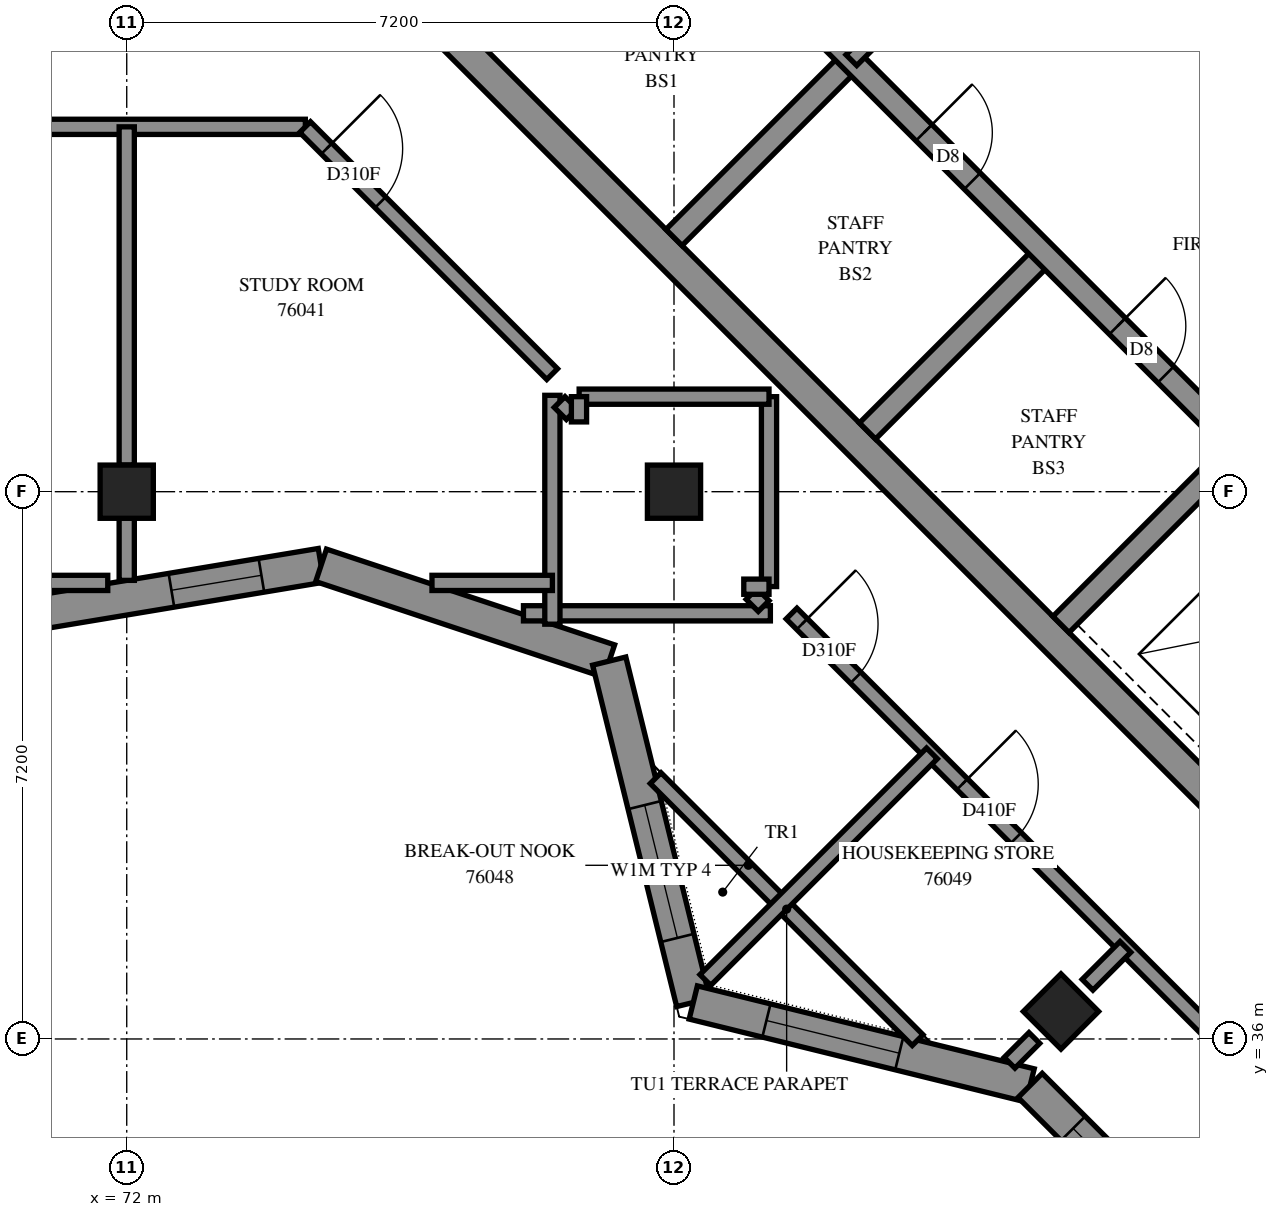
"""IFC4 building model, lengths in metres.
Left out: names, types, materials, properties, quantities, classifications, styles, units other than length and angle.
Written with IfcOpenShell. Run it as: python <this file> out.ifc"""

import sys

from ifc_helpers import new_model, si_unit, direction, frame, frame_2d, origin, origin_2d, place, context, subcontext, project, spatial, polyline, rectangle, outline, extrude, element, fill, save


model = new_model("IFC4")
c1 = context("Model", 3, precision=1e-05, world=origin(), true_north=direction((0.0, 1.0)))
c2 = subcontext(c1, "Body", "Model", "MODEL_VIEW")
j1 = project(units=[si_unit("LENGTHUNIT", "METRE"), si_unit("PLANEANGLEUNIT", "RADIAN")], contexts=[c1])
p1 = place(None, origin())
s1 = spatial("IfcSite", under=j1, at=p1, CompositionType="ELEMENT")
p2 = place(p1, origin())
s2 = spatial("IfcBuilding", under=s1, at=p2, CompositionType="ELEMENT")
p3 = place(p2, frame((0.0, 0.0, 277.8)))
s3 = spatial("IfcBuildingStorey", under=s2, at=p3, CompositionType="ELEMENT", Elevation=277.8)
for number, where, z_axis, x_axis in (
    (1, (72.0, 43.2, 0.0), (0.0, 0.0, 1.0), (1.0, 0.0, 0.0)),
    (2, (79.2, 43.2, 0.0), (0.0, 0.0, 1.0), (1.0, 0.0, 0.0)),
    (3, (84.291, 36.362, 0.0), (0.0, 0.0, 1.0), (0.707, -0.707, 0.0)),
):
    element("IfcColumn", number, at=place(p3, frame(where, z_axis=z_axis, x_axis=x_axis)), inside=s3, PredefinedType="COLUMN", context=c2, shape_type="SweptSolid", body=[
        extrude(rectangle(XDim=0.7, YDim=0.7, at=origin_2d()), origin(), (0.0, 0.0, 1.0), 3.1),
    ])
p4 = place(p3, frame((76.23, 49.231, -0.3), z_axis=(0.0, 0.0, 1.0), x_axis=(0.7071034917, -0.7071100706, 0.0)))
e4 = element("IfcWall", 4, at=p4, inside=s3, PredefinedType="SHEAR", context=c2, shape_type="SweptSolid", body=[
    extrude(rectangle(XDim=15.2, YDim=0.4, at=frame_2d((7.6, 0.0))), origin(), (0.0, 0.0, 1.0), 2.7),
])
p5 = place(p3, frame((79.2, 46.544, 0.0), z_axis=(0.0, 0.0, 1.0), x_axis=(0.7071219326, 0.7070916295, 0.0)))
e5 = element("IfcWall", 5, at=p5, inside=s3, PredefinedType="SOLIDWALL", context=c2, shape_type="SweptSolid", body=[
    extrude(rectangle(XDim=3.3, YDim=0.3, at=frame_2d((1.65, 0.0))), origin(), (0.0, 0.0, 1.0), 3.1),
])
for number, where, z_axis, x_axis in (
    (6, (81.746, 43.999, 0.0), (0.0, 0.0, 1.0), (0.707, 0.707, 0.0)),
    (7, (84.291, 41.453, 0.0), (0.0, 0.0, 1.0), (0.707, 0.707, 0.0)),
):
    element("IfcWall", number, at=place(p3, frame(where, z_axis=z_axis, x_axis=x_axis)), inside=s3, PredefinedType="SOLIDWALL", context=c2, shape_type="SweptSolid", body=[
        extrude(rectangle(XDim=3.3, YDim=0.3, at=frame_2d((1.65, 0.0))), origin(), (0.0, 0.0, 1.0), 3.1),
    ])
p6 = place(p3, frame((78.988, 51.423, 0.0), z_axis=(0.0, 0.0, 1.0), x_axis=(0.7071067812, -0.7071067812, 0.0)))
e8 = element("IfcWall", 8, at=p6, inside=s3, PredefinedType="SOLIDWALL", context=c2, shape_type="SweptSolid", body=[
    extrude(rectangle(XDim=14.4, YDim=0.3, at=frame_2d((7.2, 0.0))), origin(), (0.0, 0.0, 1.0), 3.1),
])
p7 = place(p6, frame((1.35, 0.0, 0.0)))
e9 = element("IfcOpeningElement", 9, at=p7, cuts=e8, PredefinedType="OPENING", context=c2, shape_type="SweptSolid", body=[
    extrude(rectangle(XDim=0.9, YDim=2.1, at=frame_2d((0.45, 1.05))), frame((0.0, 0.16, 0.0), z_axis=(0.0, -1.0, 0.0), x_axis=(1.0, 0.0, 0.0)), (0.0, 0.0, 1.0), 0.32),
])
p8 = place(p6, frame((4.95, 0.0, 0.0)))
e10 = element("IfcOpeningElement", 10, at=p8, cuts=e8, PredefinedType="OPENING", context=c2, shape_type="SweptSolid", body=[
    extrude(rectangle(XDim=0.9, YDim=2.1, at=frame_2d((0.45, 1.05))), frame((0.0, 0.16, 0.0), z_axis=(0.0, -1.0, 0.0), x_axis=(1.0, 0.0, 0.0)), (0.0, 0.0, 1.0), 0.32),
])
p9 = place(p6, frame((8.55, 0.0, 0.0)))
e11 = element("IfcOpeningElement", 11, at=p9, cuts=e8, PredefinedType="OPENING", context=c2, shape_type="SweptSolid", body=[
    extrude(rectangle(XDim=0.9, YDim=2.1, at=frame_2d((0.45, 1.05))), frame((0.0, 0.16, 0.0), z_axis=(0.0, -1.0, 0.0), x_axis=(1.0, 0.0, 0.0)), (0.0, 0.0, 1.0), 0.32),
])
p10 = place(p6, frame((12.05, 0.0, 0.0)))
e12 = element("IfcOpeningElement", 12, at=p10, cuts=e8, PredefinedType="OPENING", context=c2, shape_type="SweptSolid", body=[
    extrude(rectangle(XDim=1.1, YDim=2.1, at=frame_2d((0.55, 1.05))), frame((0.0, 0.16, 0.0), z_axis=(0.0, -1.0, 0.0), x_axis=(1.0, 0.0, 0.0)), (0.0, 0.0, 1.0), 0.32),
])
p11 = place(p3, frame((81.534, 53.969, 0.0), z_axis=(0.0, 0.0, 1.0), x_axis=(0.707103309, -0.7071102534, 0.0)))
e13 = element("IfcWall", 13, at=p11, inside=s3, PredefinedType="SOLIDWALL", context=c2, shape_type="SweptSolid", body=[
    extrude(rectangle(XDim=14.4, YDim=0.3, at=frame_2d((7.2, 0.0))), origin(), (0.0, 0.0, 1.0), 3.1),
])
p12 = place(p11, frame((8.55, 0.0, 0.0)))
e14 = element("IfcOpeningElement", 14, at=p12, cuts=e13, PredefinedType="OPENING", context=c2, shape_type="SweptSolid", body=[
    extrude(rectangle(XDim=0.9, YDim=2.1, at=frame_2d((0.45, 1.05))), frame((0.0, 0.16, 0.0), z_axis=(0.0, -1.0, 0.0), x_axis=(1.0, 0.0, 0.0)), (0.0, 0.0, 1.0), 0.32),
])
p13 = place(p11, frame((1.25, 0.0, 0.0)))
e15 = element("IfcOpeningElement", 15, at=p13, cuts=e13, PredefinedType="OPENING", context=c2, shape_type="SweptSolid", body=[
    extrude(rectangle(XDim=1.1, YDim=2.1, at=frame_2d((0.55, 1.05))), frame((0.0, 0.16, 0.0), z_axis=(0.0, -1.0, 0.0), x_axis=(1.0, 0.0, 0.0)), (0.0, 0.0, 1.0), 0.32),
])
p14 = place(p11, frame((4.85, 0.0, 0.0)))
e16 = element("IfcOpeningElement", 16, at=p14, cuts=e13, PredefinedType="OPENING", context=c2, shape_type="SweptSolid", body=[
    extrude(rectangle(XDim=1.1, YDim=2.1, at=frame_2d((0.55, 1.05))), frame((0.0, 0.16, 0.0), z_axis=(0.0, -1.0, 0.0), x_axis=(1.0, 0.0, 0.0)), (0.0, 0.0, 1.0), 0.32),
])
p15 = place(p11, frame((12.05, 0.0, 0.0)))
e17 = element("IfcOpeningElement", 17, at=p15, cuts=e13, PredefinedType="OPENING", context=c2, shape_type="SweptSolid", body=[
    extrude(rectangle(XDim=1.1, YDim=2.1, at=frame_2d((0.55, 1.05))), frame((0.0, 0.16, 0.0), z_axis=(0.0, -1.0, 0.0), x_axis=(1.0, 0.0, 0.0)), (0.0, 0.0, 1.0), 0.32),
])
p16 = place(p3, frame((70.919, 41.625, 0.0), z_axis=(0.0, 0.0, 1.0), x_axis=(0.9864078441, 0.1643154439, 0.0)))
e18 = element("IfcWall", 18, at=p16, inside=s3, PredefinedType="SOLIDWALL", context=c2, shape_type="SweptSolid", body=[
    extrude(outline(polyline([(-0.037, -0.225), (3.632, -0.225), (3.744, 0.225), (0.037, 0.225), (-0.037, -0.225)])), origin(), (0.0, 0.0, 1.0), 3.1),
])
p17 = place(p16, frame((1.692, 0.0, 0.45)))
e19 = element("IfcOpeningElement", 19, at=p17, cuts=e18, PredefinedType="OPENING", context=c2, shape_type="SweptSolid", body=[
    extrude(rectangle(XDim=1.2, YDim=2.55, at=frame_2d((0.6, 1.275))), frame((0.0, 0.235, 0.0), z_axis=(0.0, -1.0, 0.0), x_axis=(1.0, 0.0, 0.0)), (0.0, 0.0, 1.0), 0.47),
])
p18 = place(p3, frame((74.557, 42.231, 0.0), z_axis=(0.0, 0.0, 1.0), x_axis=(0.9489708056, -0.3153639328, 0.0)))
e20 = element("IfcWall", 20, at=p18, inside=s3, PredefinedType="SOLIDWALL", context=c2, shape_type="SweptSolid", body=[
    extrude(outline(polyline([(0.056, -0.225), (3.87, -0.225), (4.119, 0.225), (-0.056, 0.225), (0.056, -0.225)])), origin(), (0.0, 0.0, 1.0), 3.1),
])
p19 = place(p3, frame((78.348, 40.971, 0.0), z_axis=(0.0, 0.0, 1.0), x_axis=(0.239085216, -0.9709985888, 0.0)))
e21 = element("IfcWall", 21, at=p19, inside=s3, PredefinedType="SOLIDWALL", context=c2, shape_type="SweptSolid", body=[
    extrude(outline(polyline([(0.124, -0.225), (4.762, -0.225), (4.489, 0.225), (-0.124, 0.225), (0.124, -0.225)])), origin(), (0.0, 0.0, 1.0), 3.1),
])
p20 = place(p19, frame((1.951, 0.0, 0.7)))
e22 = element("IfcOpeningElement", 22, at=p20, cuts=e21, PredefinedType="OPENING", context=c2, shape_type="SweptSolid", body=[
    extrude(rectangle(XDim=1.8, YDim=1.8, at=frame_2d((0.9, 0.9))), frame((0.0, 0.235, 0.0), z_axis=(0.0, -1.0, 0.0), x_axis=(1.0, 0.0, 0.0)), (0.0, 0.0, 1.0), 0.47),
])
p21 = place(p3, frame((79.454, 36.48, 0.0), z_axis=(0.0, 0.0, 1.0), x_axis=(0.9709986041, -0.239085154, 0.0)))
e23 = element("IfcWall", 23, at=p21, inside=s3, PredefinedType="SOLIDWALL", context=c2, shape_type="SweptSolid", body=[
    extrude(outline(polyline([(-0.136, -0.225), (4.501, -0.225), (4.627, 0.225), (0.136, 0.225), (-0.136, -0.225)])), origin(), (0.0, 0.0, 1.0), 3.1),
])
p22 = place(p21, frame((0.991, 0.0, 0.7)))
e24 = element("IfcOpeningElement", 24, at=p22, cuts=e23, PredefinedType="OPENING", context=c2, shape_type="SweptSolid", body=[
    extrude(rectangle(XDim=1.8, YDim=1.8, at=frame_2d((0.9, 0.9))), frame((0.0, 0.235, 0.0), z_axis=(0.0, -1.0, 0.0), x_axis=(1.0, 0.0, 0.0)), (0.0, 0.0, 1.0), 0.47),
])
p23 = place(p3, frame((83.885, 35.389, 0.0), z_axis=(0.0, 0.0, 1.0), x_axis=(0.7071067812, -0.7071067812, 0.0)))
e25 = element("IfcWall", 25, at=p23, inside=s3, PredefinedType="SOLIDWALL", context=c2, shape_type="SweptSolid", body=[
    extrude(outline(polyline([(0.063, -0.225), (7.999, -0.225), (7.549, 0.225), (-0.063, 0.225), (0.063, -0.225)])), origin(), (0.0, 0.0, 1.0), 3.1),
])
p24 = place(p23, frame((0.799, 0.0, 0.7)))
e26 = element("IfcOpeningElement", 26, at=p24, cuts=e25, PredefinedType="OPENING", context=c2, shape_type="SweptSolid", body=[
    extrude(rectangle(XDim=1.8, YDim=1.8, at=frame_2d((0.9, 0.9))), frame((0.0, 0.235, 0.0), z_axis=(0.0, -1.0, 0.0), x_axis=(1.0, 0.0, 0.0)), (0.0, 0.0, 1.0), 0.47),
])
p25 = place(p23, frame((4.099, 0.0, 0.7)))
e27 = element("IfcOpeningElement", 27, at=p25, cuts=e25, PredefinedType="OPENING", context=c2, shape_type="SweptSolid", body=[
    extrude(rectangle(XDim=1.8, YDim=1.8, at=frame_2d((0.9, 0.9))), frame((0.0, 0.235, 0.0), z_axis=(0.0, -1.0, 0.0), x_axis=(1.0, 0.0, 0.0)), (0.0, 0.0, 1.0), 0.47),
])
p26 = place(p3, frame((82.405, 35.985, 0.0), z_axis=(0.0, 0.0, 1.0), x_axis=(-0.7071067812, 0.7071067812, 0.0)))
e28 = element("IfcWall", 28, at=p26, inside=s3, PredefinedType="PARAPET", context=c2, shape_type="SweptSolid", body=[
    extrude(outline(polyline([(0.0, -0.1), (4.874, -0.1), (4.874, 0.1), (0.0, 0.1), (0.0, -0.1)])), origin(), (0.0, 0.0, 1.0), 0.25),
])
p27 = place(p3, frame((81.534, 48.878, 0.0), z_axis=(0.0, 0.0, 1.0), x_axis=(0.707092892, 0.7071206701, 0.0)))
e29 = element("IfcWall", 29, at=p27, inside=s3, PredefinedType="PARTITIONING", context=c2, shape_type="SweptSolid", body=[
    extrude(rectangle(XDim=3.6, YDim=0.2, at=frame_2d((1.8, 0.0))), origin(), (0.0, 0.0, 1.0), 3.1),
])
p28 = place(p3, frame((55.2, 48.0, 0.0), z_axis=(0.0, 0.0, 1.0), x_axis=(1.0, 0.0, 0.0)))
e30 = element("IfcWall", 30, at=p28, inside=s3, PredefinedType="PARTITIONING", context=c2, shape_type="SweptSolid", body=[
    extrude(rectangle(XDim=19.15, YDim=0.2, at=frame_2d((9.575, 0.0))), origin(), (0.0, 0.0, 1.0), 3.1),
])
p29 = place(p28, frame((4.475, 0.0, 0.0)))
e31 = element("IfcOpeningElement", 31, at=p29, cuts=e30, PredefinedType="OPENING", context=c2, shape_type="SweptSolid", body=[
    extrude(rectangle(XDim=1.0, YDim=2.1, at=frame_2d((0.5, 1.05))), frame((0.0, 0.11, 0.0), z_axis=(0.0, -1.0, 0.0), x_axis=(1.0, 0.0, 0.0)), (0.0, 0.0, 1.0), 0.22),
])
p30 = place(p28, frame((6.525, 0.0, 0.0)))
e32 = element("IfcOpeningElement", 32, at=p30, cuts=e30, PredefinedType="OPENING", context=c2, shape_type="SweptSolid", body=[
    extrude(rectangle(XDim=1.0, YDim=2.1, at=frame_2d((0.5, 1.05))), frame((0.0, 0.11, 0.0), z_axis=(0.0, -1.0, 0.0), x_axis=(1.0, 0.0, 0.0)), (0.0, 0.0, 1.0), 0.22),
])
p31 = place(p28, frame((13.463, 0.0, 0.0)))
e33 = element("IfcOpeningElement", 33, at=p31, cuts=e30, PredefinedType="OPENING", context=c2, shape_type="SweptSolid", body=[
    extrude(rectangle(XDim=1.0, YDim=2.1, at=frame_2d((0.5, 1.05))), frame((0.0, 0.11, 0.0), z_axis=(0.0, -1.0, 0.0), x_axis=(1.0, 0.0, 0.0)), (0.0, 0.0, 1.0), 0.22),
])
p32 = place(p3, frame((80.747, 41.597, 0.0), z_axis=(0.0, 0.0, 1.0), x_axis=(0.7071067812, -0.7071067812, 0.0)))
e34 = element("IfcWall", 34, at=p32, inside=s3, PredefinedType="PARTITIONING", context=c2, shape_type="SweptSolid", body=[
    extrude(rectangle(XDim=8.607, YDim=0.2, at=frame_2d((4.303, 0.0))), origin(), (0.0, 0.0, 1.0), 3.1),
])
p33 = place(p32, frame((0.195, 0.0, 0.0)))
e35 = element("IfcOpeningElement", 35, at=p33, cuts=e34, PredefinedType="OPENING", context=c2, shape_type="SweptSolid", body=[
    extrude(rectangle(XDim=1.0, YDim=2.1, at=frame_2d((0.5, 1.05))), frame((0.0, 0.11, 0.0), z_axis=(0.0, -1.0, 0.0), x_axis=(1.0, 0.0, 0.0)), (0.0, 0.0, 1.0), 0.22),
])
p34 = place(p32, frame((3.175, 0.0, 0.0)))
e36 = element("IfcOpeningElement", 36, at=p34, cuts=e34, PredefinedType="OPENING", context=c2, shape_type="SweptSolid", body=[
    extrude(rectangle(XDim=1.0, YDim=2.1, at=frame_2d((0.5, 1.05))), frame((0.0, 0.11, 0.0), z_axis=(0.0, -1.0, 0.0), x_axis=(1.0, 0.0, 0.0)), (0.0, 0.0, 1.0), 0.22),
])
p35 = place(p3, frame((74.347, 47.997, 0.0), z_axis=(0.0, 0.0, 1.0), x_axis=(0.7071067812, -0.7071067812, 0.0)))
e37 = element("IfcWall", 37, at=p35, inside=s3, PredefinedType="PARTITIONING", context=c2, shape_type="SweptSolid", body=[
    extrude(rectangle(XDim=4.596, YDim=0.2, at=frame_2d((2.298, 0.0))), origin(), (0.0, 0.0, 1.0), 3.1),
])
p36 = place(p35, frame((0.401, 0.0, 0.0)))
e38 = element("IfcOpeningElement", 38, at=p36, cuts=e37, PredefinedType="OPENING", context=c2, shape_type="SweptSolid", body=[
    extrude(rectangle(XDim=1.0, YDim=2.1, at=frame_2d((0.5, 1.05))), frame((0.0, 0.11, 0.0), z_axis=(0.0, -1.0, 0.0), x_axis=(1.0, 0.0, 0.0)), (0.0, 0.0, 1.0), 0.22),
])
p37 = place(p3, frame((72.0, 43.55, 0.0), z_axis=(0.0, 0.0, 1.0), x_axis=(0.0, 1.0, 0.0)))
e39 = element("IfcWall", 39, at=p37, inside=s3, PredefinedType="PARTITIONING", context=c2, shape_type="SweptSolid", body=[
    extrude(rectangle(XDim=4.45, YDim=0.2, at=frame_2d((2.225, 0.0))), origin(), (0.0, 0.0, 1.0), 3.1),
])
p38 = place(p3, frame((79.612, 36.776, 0.0), z_axis=(0.0, 0.0, 1.0), x_axis=(0.7071186423, 0.7070949199, 0.0)))
e40 = element("IfcWall", 40, at=p38, inside=s3, PredefinedType="PARTITIONING", context=c2, shape_type="SweptSolid", body=[
    extrude(rectangle(XDim=4.215, YDim=0.2, at=frame_2d((2.108, 0.0))), origin(), (0.0, 0.0, 1.0), 3.1),
])
p39 = place(p3, frame((77.219, 41.6, 0.0), z_axis=(0.0, 0.0, 1.0), x_axis=(1.0, 0.0, 0.0)))
e41 = element("IfcWall", 41, at=p39, inside=s3, PredefinedType="PARTITIONING", context=c2, shape_type="SweptSolid", body=[
    extrude(rectangle(XDim=3.248, YDim=0.2, at=frame_2d((1.624, 0.0))), origin(), (0.0, 0.0, 1.0), 3.1),
])
p40 = place(p3, frame((77.6, 41.457, 0.0), z_axis=(0.0, 0.0, 1.0), x_axis=(0.0, 1.0, 0.0)))
e42 = element("IfcWall", 42, at=p40, inside=s3, PredefinedType="PARTITIONING", context=c2, shape_type="SweptSolid", body=[
    extrude(rectangle(XDim=3.011, YDim=0.2, at=frame_2d((1.506, 0.0))), origin(), (0.0, 0.0, 1.0), 3.1),
])
for number, where, z_axis, x_axis in (
    (43, (80.45, 41.952, 0.0), (0.0, 0.0, 1.0), (0.0, 1.0, 0.0)),
    (44, (77.952, 44.45, 0.0), (0.0, 0.0, 1.0), (1.0, 0.0, 0.0)),
):
    element("IfcWall", number, at=place(p3, frame(where, z_axis=z_axis, x_axis=x_axis)), inside=s3, PredefinedType="PARTITIONING", context=c2, shape_type="SweptSolid", body=[
        extrude(rectangle(XDim=2.498, YDim=0.2, at=frame_2d((1.249, 0.0))), origin(), (0.0, 0.0, 1.0), 3.1),
    ])
p41 = place(p3, frame((70.088, 42.0, 0.0), z_axis=(0.0, 0.0, 1.0), x_axis=(1.0, 0.0, 0.0)))
e45 = element("IfcWall", 45, at=p41, inside=s3, PredefinedType="PARTITIONING", context=c2, shape_type="SweptSolid", body=[
    extrude(rectangle(XDim=1.663, YDim=0.2, at=frame_2d((0.831, 0.0))), origin(), (0.0, 0.0, 1.0), 3.1),
])
p42 = place(p3, frame((76.016, 42.0, 0.0), z_axis=(0.0, 0.0, 1.0), x_axis=(1.0, 0.0, 0.0)))
e46 = element("IfcWall", 46, at=p42, inside=s3, PredefinedType="PARTITIONING", context=c2, shape_type="SweptSolid", body=[
    extrude(rectangle(XDim=1.584, YDim=0.2, at=frame_2d((0.792, 0.0))), origin(), (0.0, 0.0, 1.0), 3.1),
])
p43 = place(p3, frame((72.0, 42.033, 0.0), z_axis=(0.0, 0.0, 1.0), x_axis=(0.0, 1.0, 0.0)))
e47 = element("IfcWall", 47, at=p43, inside=s3, PredefinedType="PARTITIONING", context=c2, shape_type="SweptSolid", body=[
    extrude(rectangle(XDim=0.817, YDim=0.2, at=frame_2d((0.408, 0.0))), origin(), (0.0, 0.0, 1.0), 3.1),
])
p44 = place(p3, frame((84.641, 36.713, 0.0), z_axis=(0.0, 0.0, 1.0), x_axis=(0.7071067812, 0.7071067812, 0.0)))
e48 = element("IfcWall", 48, at=p44, inside=s3, PredefinedType="PARTITIONING", context=c2, shape_type="SweptSolid", body=[
    extrude(rectangle(XDim=0.704, YDim=0.2, at=frame_2d((0.352, 0.0))), origin(), (0.0, 0.0, 1.0), 3.1),
])
for number, where, z_axis, x_axis in (
    (49, (80.221, 41.855, 0.0), (0.0, 0.0, 1.0), (0.707, -0.707, 0.0)),
    (50, (77.695, 44.38, 0.0), (0.0, 0.0, 1.0), (0.707, -0.707, 0.0)),
):
    element("IfcWall", number, at=place(p3, frame(where, z_axis=z_axis, x_axis=x_axis)), inside=s3, PredefinedType="PARTITIONING", context=c2, shape_type="SweptSolid", body=[
        extrude(rectangle(XDim=0.225, YDim=0.2, at=frame_2d((0.112, 0.0))), origin(), (0.0, 0.0, 1.0), 3.1),
    ])
p45 = place(p3, frame((83.615, 35.687, 0.0), z_axis=(0.0, 0.0, 1.0), x_axis=(0.7069983375, 0.7072152082, 0.0)))
e51 = element("IfcWall", 51, at=p45, inside=s3, PredefinedType="PARTITIONING", context=c2, shape_type="SweptSolid", body=[
    extrude(rectangle(XDim=0.461, YDim=0.2, at=frame_2d((0.231, 0.0))), origin(), (0.0, 0.0, 1.0), 3.1),
])
for number, where, z_axis, x_axis in (
    (52, (80.118, 41.95, 0.0), (0.0, 0.0, 1.0), (1.0, 0.0, 0.0)),
    (53, (77.95, 44.118, 0.0), (0.0, 0.0, 1.0), (0.0, 1.0, 0.0)),
):
    element("IfcWall", number, at=place(p3, frame(where, z_axis=z_axis, x_axis=x_axis)), inside=s3, PredefinedType="PARTITIONING", context=c2, shape_type="SweptSolid", body=[
        extrude(rectangle(XDim=0.332, YDim=0.2, at=frame_2d((0.166, 0.0))), origin(), (0.0, 0.0, 1.0), 3.1),
    ])
p46 = place(p17, origin())
e54 = element("IfcWindow", 54, at=p46, inside=s3, PartitioningType="SINGLE_PANEL", PredefinedType="WINDOW", context=c2, shape_type="SweptSolid", body=[
    extrude(rectangle(XDim=1.2, YDim=2.55, at=frame_2d((0.6, 1.275))), frame((0.0, 0.205, 0.0), z_axis=(0.0, -1.0, 0.0), x_axis=(1.0, 0.0, 0.0)), (0.0, 0.0, 1.0), 0.06),
])
fill(e19, e54)
p47 = place(p20, origin())
e55 = element("IfcWindow", 55, at=p47, inside=s3, PartitioningType="SINGLE_PANEL", PredefinedType="WINDOW", context=c2, shape_type="SweptSolid", body=[
    extrude(rectangle(XDim=1.8, YDim=1.8, at=frame_2d((0.9, 0.9))), frame((0.0, 0.205, 0.0), z_axis=(0.0, -1.0, 0.0), x_axis=(1.0, 0.0, 0.0)), (0.0, 0.0, 1.0), 0.06),
])
fill(e22, e55)
p48 = place(p22, origin())
e56 = element("IfcWindow", 56, at=p48, inside=s3, PartitioningType="SINGLE_PANEL", PredefinedType="WINDOW", context=c2, shape_type="SweptSolid", body=[
    extrude(rectangle(XDim=1.8, YDim=1.8, at=frame_2d((0.9, 0.9))), frame((0.0, 0.205, 0.0), z_axis=(0.0, -1.0, 0.0), x_axis=(1.0, 0.0, 0.0)), (0.0, 0.0, 1.0), 0.06),
])
fill(e24, e56)
p49 = place(p24, origin())
e57 = element("IfcWindow", 57, at=p49, inside=s3, PartitioningType="SINGLE_PANEL", PredefinedType="WINDOW", context=c2, shape_type="SweptSolid", body=[
    extrude(rectangle(XDim=1.8, YDim=1.8, at=frame_2d((0.9, 0.9))), frame((0.0, 0.205, 0.0), z_axis=(0.0, -1.0, 0.0), x_axis=(1.0, 0.0, 0.0)), (0.0, 0.0, 1.0), 0.06),
])
fill(e26, e57)
p50 = place(p8, origin())
e58 = element("IfcDoor", 58, at=p50, inside=s3, OperationType="SINGLE_SWING_LEFT", PredefinedType="DOOR", context=c2, shape_type="SweptSolid", body=[
    extrude(rectangle(XDim=0.9, YDim=2.1, at=frame_2d((0.45, 1.05))), frame((0.0, 0.025, 0.0), z_axis=(0.0, -1.0, 0.0), x_axis=(1.0, 0.0, 0.0)), (0.0, 0.0, 1.0), 0.05),
])
fill(e10, e58)
p51 = place(p9, origin())
e59 = element("IfcDoor", 59, at=p51, inside=s3, OperationType="SINGLE_SWING_LEFT", PredefinedType="DOOR", context=c2, shape_type="SweptSolid", body=[
    extrude(rectangle(XDim=0.9, YDim=2.1, at=frame_2d((0.45, 1.05))), frame((0.0, 0.025, 0.0), z_axis=(0.0, -1.0, 0.0), x_axis=(1.0, 0.0, 0.0)), (0.0, 0.0, 1.0), 0.05),
])
fill(e11, e59)
p52 = place(p36, origin())
e60 = element("IfcDoor", 60, at=p52, inside=s3, OperationType="SINGLE_SWING_LEFT", PredefinedType="DOOR", context=c2, shape_type="SweptSolid", body=[
    extrude(rectangle(XDim=1.0, YDim=2.1, at=frame_2d((0.5, 1.05))), frame((0.0, 0.025, 0.0), z_axis=(0.0, -1.0, 0.0), x_axis=(1.0, 0.0, 0.0)), (0.0, 0.0, 1.0), 0.05),
])
fill(e38, e60)
p53 = place(p33, origin())
e61 = element("IfcDoor", 61, at=p53, inside=s3, OperationType="SINGLE_SWING_LEFT", PredefinedType="DOOR", context=c2, shape_type="SweptSolid", body=[
    extrude(rectangle(XDim=1.0, YDim=2.1, at=frame_2d((0.5, 1.05))), frame((0.0, 0.025, 0.0), z_axis=(0.0, -1.0, 0.0), x_axis=(1.0, 0.0, 0.0)), (0.0, 0.0, 1.0), 0.05),
])
fill(e35, e61)
p54 = place(p34, origin())
e62 = element("IfcDoor", 62, at=p54, inside=s3, OperationType="SINGLE_SWING_LEFT", PredefinedType="DOOR", context=c2, shape_type="SweptSolid", body=[
    extrude(rectangle(XDim=1.0, YDim=2.1, at=frame_2d((0.5, 1.05))), frame((0.0, 0.025, 0.0), z_axis=(0.0, -1.0, 0.0), x_axis=(1.0, 0.0, 0.0)), (0.0, 0.0, 1.0), 0.05),
])
fill(e36, e62)
save(model, sys.argv[1])
